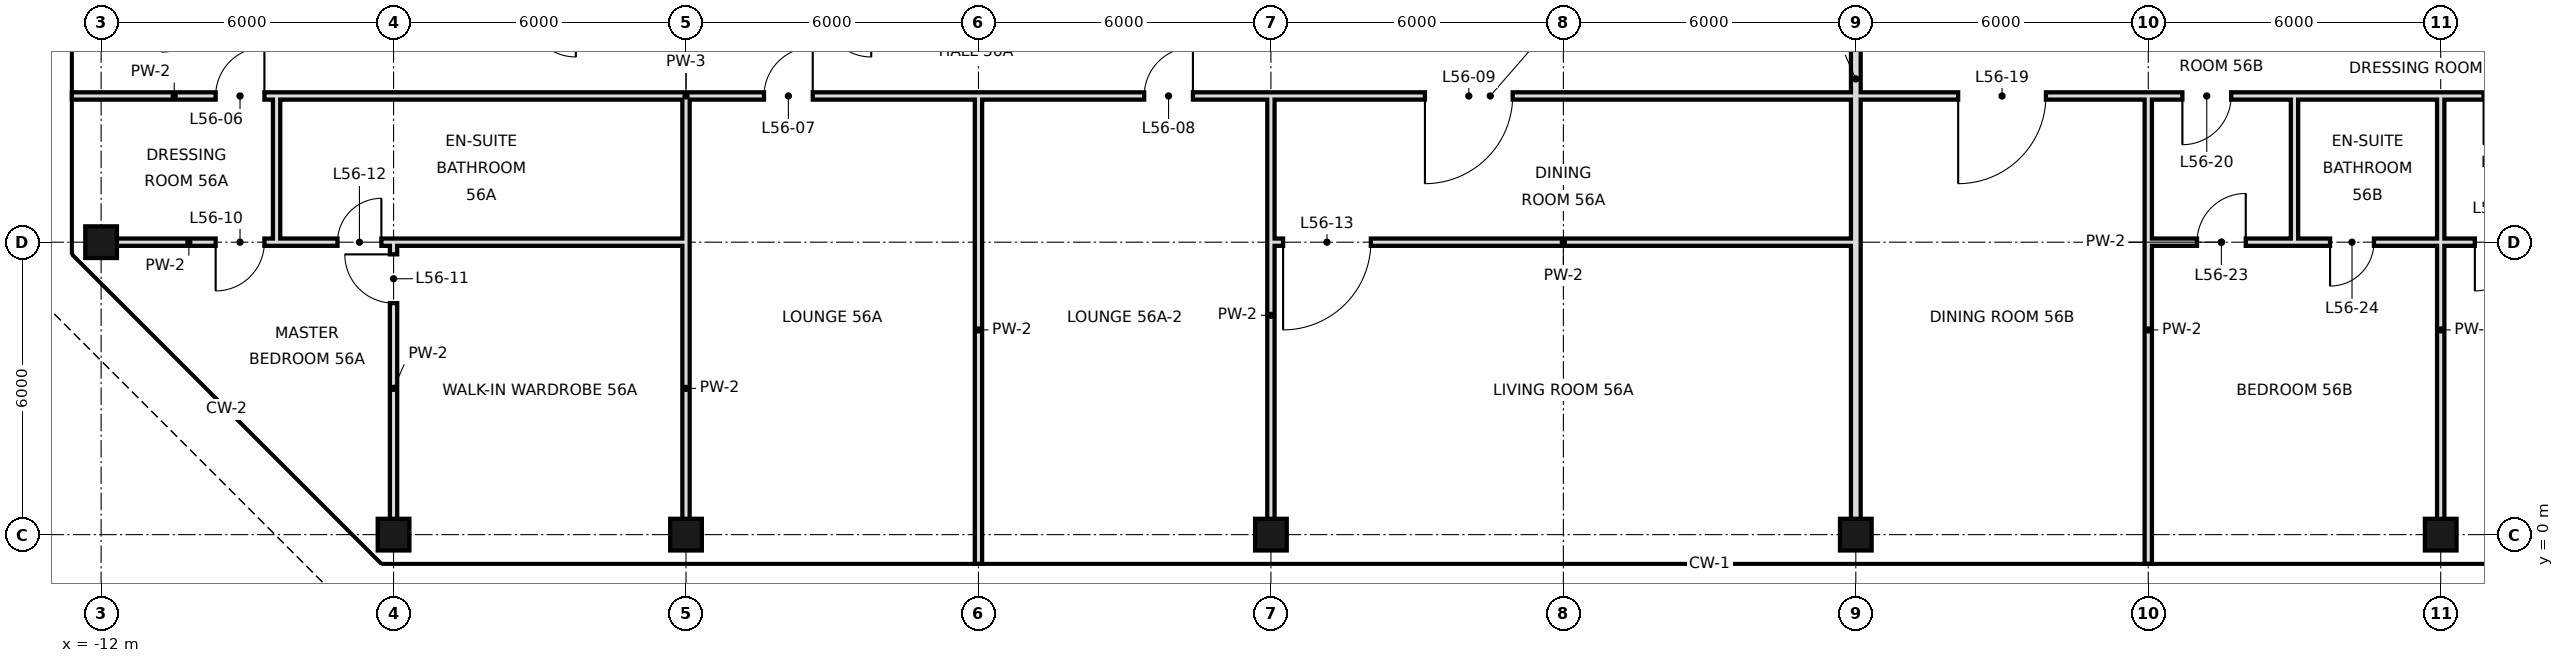
"""IFC4 building model, lengths in metres.
Left out: names, types, materials, properties, quantities, classifications, styles, units other than length and angle.
Written with IfcOpenShell. Run it as: python <this file> out.ifc"""

import sys

from ifc_helpers import new_model, si_unit, direction, frame, frame_2d, origin, origin_2d, place, context, subcontext, project, spatial, rectangle, hollow_rectangle, extrude, element, fill, save


model = new_model("IFC4")
c1 = context("Model", 3, precision=1e-05, world=origin(), true_north=direction((0.0, 1.0)))
c2 = subcontext(c1, "Body", "Model", "MODEL_VIEW")
j1 = project(units=[si_unit("LENGTHUNIT", "METRE"), si_unit("PLANEANGLEUNIT", "RADIAN")], contexts=[c1])
p1 = place(None, origin())
s1 = spatial("IfcSite", under=j1, at=p1, CompositionType="ELEMENT")
p2 = place(p1, origin())
s2 = spatial("IfcBuilding", under=s1, at=p2, CompositionType="ELEMENT")
p3 = place(p2, frame((0.0, 0.0, 239.6)))
s3 = spatial("IfcBuildingStorey", under=s2, at=p3, CompositionType="ELEMENT", Elevation=239.6)
for number, where, z_axis, x_axis in (
    (1, (-12.0, 6.0, 0.0), (0.0, 0.0, 1.0), (1.0, 0.0, 0.0)),
    (2, (-6.0, 0.0, 0.0), (0.0, 0.0, 1.0), (1.0, 0.0, 0.0)),
    (3, (0.0, 0.0, 0.0), (0.0, 0.0, 1.0), (1.0, 0.0, 0.0)),
    (4, (12.0, 0.0, 0.0), (0.0, 0.0, 1.0), (1.0, 0.0, 0.0)),
    (5, (24.0, 0.0, 0.0), (0.0, 0.0, 1.0), (1.0, 0.0, 0.0)),
    (6, (36.0, 0.0, 0.0), (0.0, 0.0, 1.0), (1.0, 0.0, 0.0)),
):
    element("IfcColumn", number, at=place(p3, frame(where, z_axis=z_axis, x_axis=x_axis)), inside=s3, PredefinedType="COLUMN", context=c2, shape_type="SweptSolid", body=[
        extrude(hollow_rectangle(XDim=0.65, YDim=0.65, WallThickness=0.032, at=origin_2d()), origin(), (0.0, 0.0, 1.0), 3.6),
    ])
p4 = place(p3, frame((-6.0, 0.0, 0.0), z_axis=(0.0, 0.0, 1.0), x_axis=(0.0, 1.0, 0.0)))
e7 = element("IfcWall", 7, at=p4, inside=s3, PredefinedType="PARTITIONING", context=c2, shape_type="SweptSolid", body=[
    extrude(rectangle(XDim=6.0, YDim=0.15, at=frame_2d((3.0, 0.0))), origin(), (0.0, 0.0, 1.0), 3.42),
])
p5 = place(p4, frame((4.75, 0.0, 0.0)))
e8 = element("IfcOpeningElement", 8, at=p5, cuts=e7, PredefinedType="OPENING", context=c2, shape_type="SweptSolid", body=[
    extrude(rectangle(XDim=1.0, YDim=2.4, at=frame_2d((0.5, 1.2))), frame((0.0, 0.085, 0.0), z_axis=(0.0, -1.0, 0.0), x_axis=(1.0, 0.0, 0.0)), (0.0, 0.0, 1.0), 0.17),
])
p6 = place(p3, frame((-8.4, 6.0, 0.0), z_axis=(0.0, 0.0, 1.0), x_axis=(0.0, 1.0, 0.0)))
e9 = element("IfcWall", 9, at=p6, inside=s3, PredefinedType="PARTITIONING", context=c2, shape_type="SweptSolid", body=[
    extrude(rectangle(XDim=3.0, YDim=0.15, at=frame_2d((1.5, 0.0))), origin(), (0.0, 0.0, 1.0), 3.42),
])
p7 = place(p3, frame((0.0, 0.0, 0.0), z_axis=(0.0, 0.0, 1.0), x_axis=(0.0, 1.0, 0.0)))
e10 = element("IfcWall", 10, at=p7, inside=s3, PredefinedType="PARTITIONING", context=c2, shape_type="SweptSolid", body=[
    extrude(rectangle(XDim=6.0, YDim=0.15, at=frame_2d((3.0, 0.0))), origin(), (0.0, 0.0, 1.0), 2.72),
])
p8 = place(p3, frame((0.0, 6.0, 0.0), z_axis=(0.0, 0.0, 1.0), x_axis=(0.0, 1.0, 0.0)))
e11 = element("IfcWall", 11, at=p8, inside=s3, PredefinedType="PARTITIONING", context=c2, shape_type="SweptSolid", body=[
    extrude(rectangle(XDim=3.0, YDim=0.15, at=frame_2d((1.5, 0.0))), origin(), (0.0, 0.0, 1.0), 2.72),
])
p9 = place(p3, frame((12.0, 0.0, 0.0), z_axis=(0.0, 0.0, 1.0), x_axis=(0.0, 1.0, 0.0)))
e12 = element("IfcWall", 12, at=p9, inside=s3, PredefinedType="PARTITIONING", context=c2, shape_type="SweptSolid", body=[
    extrude(rectangle(XDim=9.0, YDim=0.15, at=frame_2d((4.5, 0.0))), origin(), (0.0, 0.0, 1.0), 2.72),
])
p10 = place(p3, frame((24.0, 0.0, 0.0), z_axis=(0.0, 0.0, 1.0), x_axis=(0.0, 1.0, 0.0)))
e13 = element("IfcWall", 13, at=p10, inside=s3, PredefinedType="SOLIDWALL", context=c2, shape_type="SweptSolid", body=[
    extrude(rectangle(XDim=18.7, YDim=0.2, at=frame_2d((9.35, 0.0))), origin(), (0.0, 0.0, 1.0), 2.72),
])
p11 = place(p3, frame((30.0, -0.6, 0.0), z_axis=(0.0, 0.0, 1.0), x_axis=(0.0, 1.0, 0.0)))
e14 = element("IfcWall", 14, at=p11, inside=s3, PredefinedType="PARTITIONING", context=c2, shape_type="SweptSolid", body=[
    extrude(rectangle(XDim=9.6, YDim=0.15, at=frame_2d((4.8, 0.0))), origin(), (0.0, 0.0, 1.0), 2.72),
])
p12 = place(p3, frame((33.0, 6.0, 0.0), z_axis=(0.0, 0.0, 1.0), x_axis=(0.0, 1.0, 0.0)))
e15 = element("IfcWall", 15, at=p12, inside=s3, PredefinedType="PARTITIONING", context=c2, shape_type="SweptSolid", body=[
    extrude(rectangle(XDim=3.0, YDim=0.15, at=frame_2d((1.5, 0.0))), origin(), (0.0, 0.0, 1.0), 3.42),
])
p13 = place(p3, frame((36.0, 0.0, 0.0), z_axis=(0.0, 0.0, 1.0), x_axis=(0.0, 1.0, 0.0)))
e16 = element("IfcWall", 16, at=p13, inside=s3, PredefinedType="PARTITIONING", context=c2, shape_type="SweptSolid", body=[
    extrude(rectangle(XDim=6.0, YDim=0.15, at=frame_2d((3.0, 0.0))), origin(), (0.0, 0.0, 1.0), 2.72),
])
p14 = place(p3, frame((36.0, 6.0, 0.0), z_axis=(0.0, 0.0, 1.0), x_axis=(0.0, 1.0, 0.0)))
e17 = element("IfcWall", 17, at=p14, inside=s3, PredefinedType="PARTITIONING", context=c2, shape_type="SweptSolid", body=[
    extrude(rectangle(XDim=3.0, YDim=0.15, at=frame_2d((1.5, 0.0))), origin(), (0.0, 0.0, 1.0), 2.72),
])
p15 = place(p3, frame((6.0, -0.6, 0.0), z_axis=(0.0, 0.0, 1.0), x_axis=(0.0, 1.0, 0.0)))
e18 = element("IfcWall", 18, at=p15, inside=s3, PredefinedType="PARTITIONING", context=c2, shape_type="SweptSolid", body=[
    extrude(rectangle(XDim=9.6, YDim=0.15, at=frame_2d((4.8, 0.0))), origin(), (0.0, 0.0, 1.0), 2.72),
])
p16 = place(p3, frame((-12.0, 6.0, 0.0), z_axis=(0.0, 0.0, 1.0), x_axis=(1.0, 0.0, 0.0)))
e19 = element("IfcWall", 19, at=p16, inside=s3, PredefinedType="PARTITIONING", context=c2, shape_type="SweptSolid", body=[
    extrude(rectangle(XDim=3.6, YDim=0.15, at=frame_2d((1.8, 0.0))), origin(), (0.0, 0.0, 1.0), 2.72),
])
p17 = place(p16, frame((2.35, 0.0, 0.0)))
e20 = element("IfcOpeningElement", 20, at=p17, cuts=e19, PredefinedType="OPENING", context=c2, shape_type="SweptSolid", body=[
    extrude(rectangle(XDim=1.0, YDim=2.4, at=frame_2d((0.5, 1.2))), frame((0.0, 0.085, 0.0), z_axis=(0.0, -1.0, 0.0), x_axis=(1.0, 0.0, 0.0)), (0.0, 0.0, 1.0), 0.17),
])
p18 = place(p3, frame((12.0, 6.0, 0.0), z_axis=(0.0, 0.0, 1.0), x_axis=(1.0, 0.0, 0.0)))
e21 = element("IfcWall", 21, at=p18, inside=s3, PredefinedType="PARTITIONING", context=c2, shape_type="SweptSolid", body=[
    extrude(rectangle(XDim=12.0, YDim=0.15, at=frame_2d((6.0, 0.0))), origin(), (0.0, 0.0, 1.0), 2.97),
])
p19 = place(p18, frame((0.25, 0.0, 0.0)))
e22 = element("IfcOpeningElement", 22, at=p19, cuts=e21, PredefinedType="OPENING", context=c2, shape_type="SweptSolid", body=[
    extrude(rectangle(XDim=1.8, YDim=2.4, at=frame_2d((0.9, 1.2))), frame((0.0, 0.085, 0.0), z_axis=(0.0, -1.0, 0.0), x_axis=(1.0, 0.0, 0.0)), (0.0, 0.0, 1.0), 0.17),
])
p20 = place(p3, frame((30.0, 6.0, 0.0), z_axis=(0.0, 0.0, 1.0), x_axis=(1.0, 0.0, 0.0)))
e23 = element("IfcWall", 23, at=p20, inside=s3, PredefinedType="PARTITIONING", context=c2, shape_type="SweptSolid", body=[
    extrude(rectangle(XDim=3.0, YDim=0.15, at=frame_2d((1.5, 0.0))), origin(), (0.0, 0.0, 1.0), 2.97),
])
p21 = place(p20, frame((1.0, 0.0, 0.0)))
e24 = element("IfcOpeningElement", 24, at=p21, cuts=e23, PredefinedType="OPENING", context=c2, shape_type="SweptSolid", body=[
    extrude(rectangle(XDim=1.0, YDim=2.4, at=frame_2d((0.5, 1.2))), frame((0.0, 0.085, 0.0), z_axis=(0.0, -1.0, 0.0), x_axis=(1.0, 0.0, 0.0)), (0.0, 0.0, 1.0), 0.17),
])
p22 = place(p3, frame((36.0, 6.0, 0.0), z_axis=(0.0, 0.0, 1.0), x_axis=(1.0, 0.0, 0.0)))
e25 = element("IfcWall", 25, at=p22, inside=s3, PredefinedType="PARTITIONING", context=c2, shape_type="SweptSolid", body=[
    extrude(rectangle(XDim=2.4, YDim=0.15, at=frame_2d((1.2, 0.0))), origin(), (0.0, 0.0, 1.0), 2.97),
])
p23 = place(p22, frame((0.7, 0.0, 0.0)))
e26 = element("IfcOpeningElement", 26, at=p23, cuts=e25, PredefinedType="OPENING", context=c2, shape_type="SweptSolid", body=[
    extrude(rectangle(XDim=1.0, YDim=2.4, at=frame_2d((0.5, 1.2))), frame((0.0, 0.085, 0.0), z_axis=(0.0, -1.0, 0.0), x_axis=(1.0, 0.0, 0.0)), (0.0, 0.0, 1.0), 0.17),
])
p24 = place(p3, frame((-8.4, 6.0, 0.0), z_axis=(0.0, 0.0, 1.0), x_axis=(1.0, 0.0, 0.0)))
e27 = element("IfcWall", 27, at=p24, inside=s3, PredefinedType="PARTITIONING", context=c2, shape_type="SweptSolid", body=[
    extrude(rectangle(XDim=8.4, YDim=0.15, at=frame_2d((4.2, 0.0))), origin(), (0.0, 0.0, 1.0), 2.72),
])
p25 = place(p24, frame((1.25, 0.0, 0.0)))
e28 = element("IfcOpeningElement", 28, at=p25, cuts=e27, PredefinedType="OPENING", context=c2, shape_type="SweptSolid", body=[
    extrude(rectangle(XDim=0.9, YDim=2.4, at=frame_2d((0.45, 1.2))), frame((0.0, 0.085, 0.0), z_axis=(0.0, -1.0, 0.0), x_axis=(1.0, 0.0, 0.0)), (0.0, 0.0, 1.0), 0.17),
])
p26 = place(p3, frame((33.0, 6.0, 0.0), z_axis=(0.0, 0.0, 1.0), x_axis=(1.0, 0.0, 0.0)))
e29 = element("IfcWall", 29, at=p26, inside=s3, PredefinedType="PARTITIONING", context=c2, shape_type="SweptSolid", body=[
    extrude(rectangle(XDim=3.0, YDim=0.15, at=frame_2d((1.5, 0.0))), origin(), (0.0, 0.0, 1.0), 2.97),
])
p27 = place(p26, frame((0.73, 0.0, 0.0)))
e30 = element("IfcOpeningElement", 30, at=p27, cuts=e29, PredefinedType="OPENING", context=c2, shape_type="SweptSolid", body=[
    extrude(rectangle(XDim=0.9, YDim=2.4, at=frame_2d((0.45, 1.2))), frame((0.0, 0.085, 0.0), z_axis=(0.0, -1.0, 0.0), x_axis=(1.0, 0.0, 0.0)), (0.0, 0.0, 1.0), 0.17),
])
p28 = place(p3, frame((-12.6, 9.0, 0.0), z_axis=(0.0, 0.0, 1.0), x_axis=(1.0, 0.0, 0.0)))
e31 = element("IfcWall", 31, at=p28, inside=s3, PredefinedType="PARTITIONING", context=c2, shape_type="SweptSolid", body=[
    extrude(rectangle(XDim=4.2, YDim=0.15, at=frame_2d((2.1, 0.0))), origin(), (0.0, 0.0, 1.0), 3.42),
])
p29 = place(p28, frame((2.95, 0.0, 0.0)))
e32 = element("IfcOpeningElement", 32, at=p29, cuts=e31, PredefinedType="OPENING", context=c2, shape_type="SweptSolid", body=[
    extrude(rectangle(XDim=1.0, YDim=2.4, at=frame_2d((0.5, 1.2))), frame((0.0, 0.085, 0.0), z_axis=(0.0, -1.0, 0.0), x_axis=(1.0, 0.0, 0.0)), (0.0, 0.0, 1.0), 0.17),
])
p30 = place(p3, frame((0.0, 9.0, 0.0), z_axis=(0.0, 0.0, 1.0), x_axis=(1.0, 0.0, 0.0)))
e33 = element("IfcWall", 33, at=p30, inside=s3, PredefinedType="PARTITIONING", context=c2, shape_type="SweptSolid", body=[
    extrude(rectangle(XDim=33.0, YDim=0.15, at=frame_2d((16.5, 0.0))), origin(), (0.0, 0.0, 1.0), 3.42),
])
p31 = place(p30, frame((1.6, 0.0, 0.0)))
e34 = element("IfcOpeningElement", 34, at=p31, cuts=e33, PredefinedType="OPENING", context=c2, shape_type="SweptSolid", body=[
    extrude(rectangle(XDim=1.0, YDim=2.4, at=frame_2d((0.5, 1.2))), frame((0.0, 0.085, 0.0), z_axis=(0.0, -1.0, 0.0), x_axis=(1.0, 0.0, 0.0)), (0.0, 0.0, 1.0), 0.17),
])
p32 = place(p30, frame((9.4, 0.0, 0.0)))
e35 = element("IfcOpeningElement", 35, at=p32, cuts=e33, PredefinedType="OPENING", context=c2, shape_type="SweptSolid", body=[
    extrude(rectangle(XDim=1.0, YDim=2.4, at=frame_2d((0.5, 1.2))), frame((0.0, 0.085, 0.0), z_axis=(0.0, -1.0, 0.0), x_axis=(1.0, 0.0, 0.0)), (0.0, 0.0, 1.0), 0.17),
])
p33 = place(p30, frame((15.16, 0.0, 0.0)))
e36 = element("IfcOpeningElement", 36, at=p33, cuts=e33, PredefinedType="OPENING", context=c2, shape_type="SweptSolid", body=[
    extrude(rectangle(XDim=1.8, YDim=2.4, at=frame_2d((0.9, 1.2))), frame((0.0, 0.085, 0.0), z_axis=(0.0, -1.0, 0.0), x_axis=(1.0, 0.0, 0.0)), (0.0, 0.0, 1.0), 0.17),
])
p34 = place(p30, frame((26.1, 0.0, 0.0)))
e37 = element("IfcOpeningElement", 37, at=p34, cuts=e33, PredefinedType="OPENING", context=c2, shape_type="SweptSolid", body=[
    extrude(rectangle(XDim=1.8, YDim=2.4, at=frame_2d((0.9, 1.2))), frame((0.0, 0.085, 0.0), z_axis=(0.0, -1.0, 0.0), x_axis=(1.0, 0.0, 0.0)), (0.0, 0.0, 1.0), 0.17),
])
p35 = place(p30, frame((30.7, 0.0, 0.0)))
e38 = element("IfcOpeningElement", 38, at=p35, cuts=e33, PredefinedType="OPENING", context=c2, shape_type="SweptSolid", body=[
    extrude(rectangle(XDim=1.0, YDim=2.4, at=frame_2d((0.5, 1.2))), frame((0.0, 0.085, 0.0), z_axis=(0.0, -1.0, 0.0), x_axis=(1.0, 0.0, 0.0)), (0.0, 0.0, 1.0), 0.17),
])
p36 = place(p3, frame((36.0, 9.0, 0.0), z_axis=(0.0, 0.0, 1.0), x_axis=(1.0, 0.0, 0.0)))
e39 = element("IfcWall", 39, at=p36, inside=s3, PredefinedType="PARTITIONING", context=c2, shape_type="SweptSolid", body=[
    extrude(rectangle(XDim=2.4, YDim=0.15, at=frame_2d((1.2, 0.0))), origin(), (0.0, 0.0, 1.0), 3.42),
])
p37 = place(p36, frame((0.88, 0.0, 0.0)))
e40 = element("IfcOpeningElement", 40, at=p37, cuts=e39, PredefinedType="OPENING", context=c2, shape_type="SweptSolid", body=[
    extrude(rectangle(XDim=1.0, YDim=2.4, at=frame_2d((0.5, 1.2))), frame((0.0, 0.085, 0.0), z_axis=(0.0, -1.0, 0.0), x_axis=(1.0, 0.0, 0.0)), (0.0, 0.0, 1.0), 0.17),
])
p38 = place(p3, frame((-8.4, 9.0, 0.0), z_axis=(0.0, 0.0, 1.0), x_axis=(1.0, 0.0, 0.0)))
e41 = element("IfcWall", 41, at=p38, inside=s3, PredefinedType="PARTITIONING", context=c2, shape_type="SweptSolid", body=[
    extrude(rectangle(XDim=8.4, YDim=0.15, at=frame_2d((4.2, 0.0))), origin(), (0.0, 0.0, 1.0), 3.42),
])
p39 = place(p3, frame((33.0, 9.0, 0.0), z_axis=(0.0, 0.0, 1.0), x_axis=(1.0, 0.0, 0.0)))
e42 = element("IfcWall", 42, at=p39, inside=s3, PredefinedType="PARTITIONING", context=c2, shape_type="SweptSolid", body=[
    extrude(rectangle(XDim=3.0, YDim=0.15, at=frame_2d((1.5, 0.0))), origin(), (0.0, 0.0, 1.0), 3.42),
])
p40 = place(p29, frame((1.0, 0.0, 0.0), z_axis=(0.0, 0.0, 1.0), x_axis=(-1.0, 0.0, 0.0)))
e43 = element("IfcDoor", 43, at=p40, inside=s3, OperationType="SINGLE_SWING_LEFT", PredefinedType="DOOR", context=c2, shape_type="SweptSolid", body=[
    extrude(rectangle(XDim=1.0, YDim=2.4, at=frame_2d((0.5, 1.2))), frame((0.0, 0.025, 0.0), z_axis=(0.0, -1.0, 0.0), x_axis=(1.0, 0.0, 0.0)), (0.0, 0.0, 1.0), 0.05),
])
fill(e32, e43)
p41 = place(p31, frame((1.0, 0.0, 0.0), z_axis=(0.0, 0.0, 1.0), x_axis=(-1.0, 0.0, 0.0)))
e44 = element("IfcDoor", 44, at=p41, inside=s3, OperationType="SINGLE_SWING_LEFT", PredefinedType="DOOR", context=c2, shape_type="SweptSolid", body=[
    extrude(rectangle(XDim=1.0, YDim=2.4, at=frame_2d((0.5, 1.2))), frame((0.0, 0.025, 0.0), z_axis=(0.0, -1.0, 0.0), x_axis=(1.0, 0.0, 0.0)), (0.0, 0.0, 1.0), 0.05),
])
fill(e34, e44)
p42 = place(p32, frame((1.0, 0.0, 0.0), z_axis=(0.0, 0.0, 1.0), x_axis=(-1.0, 0.0, 0.0)))
e45 = element("IfcDoor", 45, at=p42, inside=s3, OperationType="SINGLE_SWING_LEFT", PredefinedType="DOOR", context=c2, shape_type="SweptSolid", body=[
    extrude(rectangle(XDim=1.0, YDim=2.4, at=frame_2d((0.5, 1.2))), frame((0.0, 0.025, 0.0), z_axis=(0.0, -1.0, 0.0), x_axis=(1.0, 0.0, 0.0)), (0.0, 0.0, 1.0), 0.05),
])
fill(e35, e45)
p43 = place(p33, frame((1.8, 0.0, 0.0), z_axis=(0.0, 0.0, 1.0), x_axis=(-1.0, 0.0, 0.0)))
e46 = element("IfcDoor", 46, at=p43, inside=s3, OperationType="SINGLE_SWING_RIGHT", PredefinedType="DOOR", context=c2, shape_type="SweptSolid", body=[
    extrude(rectangle(XDim=1.8, YDim=2.4, at=frame_2d((0.9, 1.2))), frame((0.0, 0.025, 0.0), z_axis=(0.0, -1.0, 0.0), x_axis=(1.0, 0.0, 0.0)), (0.0, 0.0, 1.0), 0.05),
])
fill(e36, e46)
p44 = place(p17, frame((1.0, 0.0, 0.0), z_axis=(0.0, 0.0, 1.0), x_axis=(-1.0, 0.0, 0.0)))
e47 = element("IfcDoor", 47, at=p44, inside=s3, OperationType="SINGLE_SWING_RIGHT", PredefinedType="DOOR", context=c2, shape_type="SweptSolid", body=[
    extrude(rectangle(XDim=1.0, YDim=2.4, at=frame_2d((0.5, 1.2))), frame((0.0, 0.025, 0.0), z_axis=(0.0, -1.0, 0.0), x_axis=(1.0, 0.0, 0.0)), (0.0, 0.0, 1.0), 0.05),
])
fill(e20, e47)
p45 = place(p5, frame((1.0, 0.0, 0.0), z_axis=(0.0, 0.0, 1.0), x_axis=(-1.0, 0.0, 0.0)))
e48 = element("IfcDoor", 48, at=p45, inside=s3, OperationType="SINGLE_SWING_LEFT", PredefinedType="DOOR", context=c2, shape_type="SweptSolid", body=[
    extrude(rectangle(XDim=1.0, YDim=2.4, at=frame_2d((0.5, 1.2))), frame((0.0, 0.025, 0.0), z_axis=(0.0, -1.0, 0.0), x_axis=(1.0, 0.0, 0.0)), (0.0, 0.0, 1.0), 0.05),
])
fill(e8, e48)
p46 = place(p25, frame((0.9, 0.0, 0.0), z_axis=(0.0, 0.0, 1.0), x_axis=(-1.0, 0.0, 0.0)))
e49 = element("IfcDoor", 49, at=p46, inside=s3, OperationType="SINGLE_SWING_LEFT", PredefinedType="DOOR", context=c2, shape_type="SweptSolid", body=[
    extrude(rectangle(XDim=0.9, YDim=2.4, at=frame_2d((0.45, 1.2))), frame((0.0, 0.025, 0.0), z_axis=(0.0, -1.0, 0.0), x_axis=(1.0, 0.0, 0.0)), (0.0, 0.0, 1.0), 0.05),
])
fill(e28, e49)
p47 = place(p19, frame((1.8, 0.0, 0.0), z_axis=(0.0, 0.0, 1.0), x_axis=(-1.0, 0.0, 0.0)))
e50 = element("IfcDoor", 50, at=p47, inside=s3, OperationType="SINGLE_SWING_RIGHT", PredefinedType="DOOR", context=c2, shape_type="SweptSolid", body=[
    extrude(rectangle(XDim=1.8, YDim=2.4, at=frame_2d((0.9, 1.2))), frame((0.0, 0.025, 0.0), z_axis=(0.0, -1.0, 0.0), x_axis=(1.0, 0.0, 0.0)), (0.0, 0.0, 1.0), 0.05),
])
fill(e22, e50)
p48 = place(p34, frame((1.8, 0.0, 0.0), z_axis=(0.0, 0.0, 1.0), x_axis=(-1.0, 0.0, 0.0)))
e51 = element("IfcDoor", 51, at=p48, inside=s3, OperationType="SINGLE_SWING_RIGHT", PredefinedType="DOOR", context=c2, shape_type="SweptSolid", body=[
    extrude(rectangle(XDim=1.8, YDim=2.4, at=frame_2d((0.9, 1.2))), frame((0.0, 0.025, 0.0), z_axis=(0.0, -1.0, 0.0), x_axis=(1.0, 0.0, 0.0)), (0.0, 0.0, 1.0), 0.05),
])
fill(e37, e51)
p49 = place(p35, frame((1.0, 0.0, 0.0), z_axis=(0.0, 0.0, 1.0), x_axis=(-1.0, 0.0, 0.0)))
e52 = element("IfcDoor", 52, at=p49, inside=s3, OperationType="SINGLE_SWING_RIGHT", PredefinedType="DOOR", context=c2, shape_type="SweptSolid", body=[
    extrude(rectangle(XDim=1.0, YDim=2.4, at=frame_2d((0.5, 1.2))), frame((0.0, 0.025, 0.0), z_axis=(0.0, -1.0, 0.0), x_axis=(1.0, 0.0, 0.0)), (0.0, 0.0, 1.0), 0.05),
])
fill(e38, e52)
p50 = place(p37, frame((1.0, 0.0, 0.0), z_axis=(0.0, 0.0, 1.0), x_axis=(-1.0, 0.0, 0.0)))
e53 = element("IfcDoor", 53, at=p50, inside=s3, OperationType="SINGLE_SWING_RIGHT", PredefinedType="DOOR", context=c2, shape_type="SweptSolid", body=[
    extrude(rectangle(XDim=1.0, YDim=2.4, at=frame_2d((0.5, 1.2))), frame((0.0, 0.025, 0.0), z_axis=(0.0, -1.0, 0.0), x_axis=(1.0, 0.0, 0.0)), (0.0, 0.0, 1.0), 0.05),
])
fill(e40, e53)
p51 = place(p21, frame((1.0, 0.0, 0.0), z_axis=(0.0, 0.0, 1.0), x_axis=(-1.0, 0.0, 0.0)))
e54 = element("IfcDoor", 54, at=p51, inside=s3, OperationType="SINGLE_SWING_LEFT", PredefinedType="DOOR", context=c2, shape_type="SweptSolid", body=[
    extrude(rectangle(XDim=1.0, YDim=2.4, at=frame_2d((0.5, 1.2))), frame((0.0, 0.025, 0.0), z_axis=(0.0, -1.0, 0.0), x_axis=(1.0, 0.0, 0.0)), (0.0, 0.0, 1.0), 0.05),
])
fill(e24, e54)
p52 = place(p27, frame((0.9, 0.0, 0.0), z_axis=(0.0, 0.0, 1.0), x_axis=(-1.0, 0.0, 0.0)))
e55 = element("IfcDoor", 55, at=p52, inside=s3, OperationType="SINGLE_SWING_RIGHT", PredefinedType="DOOR", context=c2, shape_type="SweptSolid", body=[
    extrude(rectangle(XDim=0.9, YDim=2.4, at=frame_2d((0.45, 1.2))), frame((0.0, 0.025, 0.0), z_axis=(0.0, -1.0, 0.0), x_axis=(1.0, 0.0, 0.0)), (0.0, 0.0, 1.0), 0.05),
])
fill(e30, e55)
p53 = place(p23, frame((1.0, 0.0, 0.0), z_axis=(0.0, 0.0, 1.0), x_axis=(-1.0, 0.0, 0.0)))
e56 = element("IfcDoor", 56, at=p53, inside=s3, OperationType="SINGLE_SWING_RIGHT", PredefinedType="DOOR", context=c2, shape_type="SweptSolid", body=[
    extrude(rectangle(XDim=1.0, YDim=2.4, at=frame_2d((0.5, 1.2))), frame((0.0, 0.025, 0.0), z_axis=(0.0, -1.0, 0.0), x_axis=(1.0, 0.0, 0.0)), (0.0, 0.0, 1.0), 0.05),
])
fill(e26, e56)
save(model, sys.argv[1])
